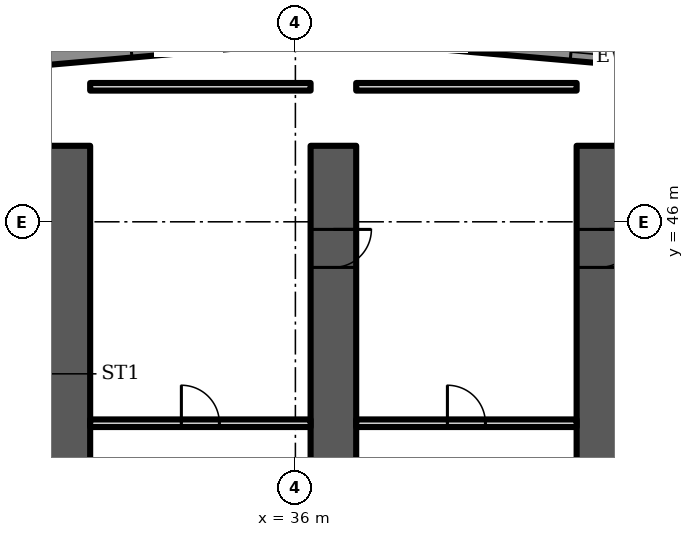
"""IFC4 building model, lengths in metres.
Left out: names, types, materials, properties, quantities, classifications, styles, units other than length and angle.
Written with IfcOpenShell. Run it as: python <this file> out.ifc"""

import sys

from ifc_helpers import new_model, si_unit, direction, frame, frame_2d, origin, place, context, subcontext, project, spatial, rectangle, extrude, element, fill, save


model = new_model("IFC4")
c1 = context("Model", 3, precision=1e-05, world=origin(), true_north=direction((0.0, 1.0)))
c2 = subcontext(c1, "Body", "Model", "MODEL_VIEW")
j1 = project(units=[si_unit("LENGTHUNIT", "METRE"), si_unit("PLANEANGLEUNIT", "RADIAN")], contexts=[c1])
p1 = place(None, origin())
s1 = spatial("IfcSite", under=j1, at=p1, CompositionType="ELEMENT")
p2 = place(p1, origin())
s2 = spatial("IfcBuilding", under=s1, at=p2, CompositionType="ELEMENT")
p3 = place(p2, frame((0.0, 0.0, 27.5)))
s3 = spatial("IfcBuildingStorey", under=s2, at=p3, CompositionType="ELEMENT", Elevation=27.5)
p4 = place(p3, frame((47.301, 50.11, 0.0), z_axis=(0.0, 0.0, 1.0), x_axis=(-0.996195, 0.087143, 0.0)))
e1 = element("IfcWall", 1, at=p4, inside=s3, PredefinedType="SOLIDWALL", context=c2, shape_type="SweptSolid", body=[
    extrude(rectangle(XDim=10.26, YDim=0.45, at=frame_2d((5.13, 0.0))), origin(), (0.0, 0.0, 1.0), 5.2),
])
p5 = place(p4, frame((1.065, 0.0, 1.0)))
e2 = element("IfcOpeningElement", 2, at=p5, cuts=e1, PredefinedType="OPENING", context=c2, shape_type="SweptSolid", body=[
    extrude(rectangle(XDim=3.0, YDim=3.2, at=frame_2d((1.5, 1.6))), frame((0.0, 0.235, 0.0), z_axis=(0.0, -1.0, 0.0), x_axis=(1.0, 0.0, 0.0)), (0.0, 0.0, 1.0), 0.47),
])
p6 = place(p4, frame((6.195, 0.0, 1.0)))
e3 = element("IfcOpeningElement", 3, at=p6, cuts=e1, PredefinedType="OPENING", context=c2, shape_type="SweptSolid", body=[
    extrude(rectangle(XDim=3.0, YDim=3.2, at=frame_2d((1.5, 1.6))), frame((0.0, 0.235, 0.0), z_axis=(0.0, -1.0, 0.0), x_axis=(1.0, 0.0, 0.0)), (0.0, 0.0, 1.0), 0.47),
])
p7 = place(p3, frame((36.0, 50.924, 0.0), z_axis=(0.0, 0.0, 1.0), x_axis=(-0.996195, -0.087145, 0.0)))
e4 = element("IfcWall", 4, at=p7, inside=s3, PredefinedType="SOLIDWALL", context=c2, shape_type="SweptSolid", body=[
    extrude(rectangle(XDim=11.344, YDim=0.45, at=frame_2d((5.672, 0.0))), origin(), (0.0, 0.0, 1.0), 5.2),
])
p8 = place(p7, frame((1.336, 0.0, 1.0)))
e5 = element("IfcOpeningElement", 5, at=p8, cuts=e4, PredefinedType="OPENING", context=c2, shape_type="SweptSolid", body=[
    extrude(rectangle(XDim=3.0, YDim=3.2, at=frame_2d((1.5, 1.6))), frame((0.0, 0.235, 0.0), z_axis=(0.0, -1.0, 0.0), x_axis=(1.0, 0.0, 0.0)), (0.0, 0.0, 1.0), 0.47),
])
p9 = place(p7, frame((7.008, 0.0, 1.0)))
e6 = element("IfcOpeningElement", 6, at=p9, cuts=e4, PredefinedType="OPENING", context=c2, shape_type="SweptSolid", body=[
    extrude(rectangle(XDim=3.0, YDim=3.2, at=frame_2d((1.5, 1.6))), frame((0.0, 0.235, 0.0), z_axis=(0.0, -1.0, 0.0), x_axis=(1.0, 0.0, 0.0)), (0.0, 0.0, 1.0), 0.47),
])
p10 = place(p3, frame((30.0, 35.2, 0.0), z_axis=(0.0, 0.0, 1.0), x_axis=(0.0, 1.0, 0.0)))
e7 = element("IfcWall", 7, at=p10, inside=s3, PredefinedType="SHEAR", context=c2, shape_type="SweptSolid", body=[
    extrude(rectangle(XDim=12.8, YDim=1.2, at=frame_2d((6.4, 0.0))), origin(), (0.0, 0.0, 1.0), 5.2),
])
p11 = place(p10, frame((3.2, 0.0, 0.0)))
e8 = element("IfcOpeningElement", 8, at=p11, cuts=e7, PredefinedType="OPENING", context=c2, shape_type="SweptSolid", body=[
    extrude(rectangle(XDim=1.1, YDim=2.1, at=frame_2d((0.55, 1.05))), frame((0.0, 0.61, 0.0), z_axis=(0.0, -1.0, 0.0), x_axis=(1.0, 0.0, 0.0)), (0.0, 0.0, 1.0), 1.22),
])
p12 = place(p3, frame((37.0, 35.2, 0.0), z_axis=(0.0, 0.0, 1.0), x_axis=(0.0, 1.0, 0.0)))
e9 = element("IfcWall", 9, at=p12, inside=s3, PredefinedType="SHEAR", context=c2, shape_type="SweptSolid", body=[
    extrude(rectangle(XDim=12.8, YDim=1.2, at=frame_2d((6.4, 0.0))), origin(), (0.0, 0.0, 1.0), 5.2),
])
p13 = place(p12, frame((3.2, 0.0, 0.0)))
e10 = element("IfcOpeningElement", 10, at=p13, cuts=e9, PredefinedType="OPENING", context=c2, shape_type="SweptSolid", body=[
    extrude(rectangle(XDim=1.1, YDim=2.1, at=frame_2d((0.55, 1.05))), frame((0.0, 0.61, 0.0), z_axis=(0.0, -1.0, 0.0), x_axis=(1.0, 0.0, 0.0)), (0.0, 0.0, 1.0), 1.22),
])
p14 = place(p12, frame((9.6, 0.0, 0.0)))
e11 = element("IfcOpeningElement", 11, at=p14, cuts=e9, PredefinedType="OPENING", context=c2, shape_type="SweptSolid", body=[
    extrude(rectangle(XDim=1.0, YDim=2.1, at=frame_2d((0.5, 1.05))), frame((0.0, 0.61, 0.0), z_axis=(0.0, -1.0, 0.0), x_axis=(1.0, 0.0, 0.0)), (0.0, 0.0, 1.0), 1.22),
])
p15 = place(p3, frame((44.0, 35.2, 0.0), z_axis=(0.0, 0.0, 1.0), x_axis=(0.0, 1.0, 0.0)))
e12 = element("IfcWall", 12, at=p15, inside=s3, PredefinedType="SHEAR", context=c2, shape_type="SweptSolid", body=[
    extrude(rectangle(XDim=12.8, YDim=1.2, at=frame_2d((6.4, 0.0))), origin(), (0.0, 0.0, 1.0), 5.2),
])
p16 = place(p15, frame((3.2, 0.0, 0.0)))
e13 = element("IfcOpeningElement", 13, at=p16, cuts=e12, PredefinedType="OPENING", context=c2, shape_type="SweptSolid", body=[
    extrude(rectangle(XDim=1.1, YDim=2.1, at=frame_2d((0.55, 1.05))), frame((0.0, 0.61, 0.0), z_axis=(0.0, -1.0, 0.0), x_axis=(1.0, 0.0, 0.0)), (0.0, 0.0, 1.0), 1.22),
])
p17 = place(p15, frame((9.6, 0.0, 0.0)))
e14 = element("IfcOpeningElement", 14, at=p17, cuts=e12, PredefinedType="OPENING", context=c2, shape_type="SweptSolid", body=[
    extrude(rectangle(XDim=1.0, YDim=2.1, at=frame_2d((0.5, 1.05))), frame((0.0, 0.61, 0.0), z_axis=(0.0, -1.0, 0.0), x_axis=(1.0, 0.0, 0.0)), (0.0, 0.0, 1.0), 1.22),
])
p18 = place(p3, frame((30.6, 40.7, 0.0), z_axis=(0.0, 0.0, 1.0), x_axis=(1.0, 0.0, 0.0)))
e15 = element("IfcWall", 15, at=p18, inside=s3, PredefinedType="PARTITIONING", context=c2, shape_type="SweptSolid", body=[
    extrude(rectangle(XDim=5.8, YDim=0.2, at=frame_2d((2.9, 0.0))), origin(), (0.0, 0.0, 1.0), 5.2),
])
p19 = place(p18, frame((2.4, 0.0, 0.0)))
e16 = element("IfcOpeningElement", 16, at=p19, cuts=e15, PredefinedType="OPENING", context=c2, shape_type="SweptSolid", body=[
    extrude(rectangle(XDim=1.0, YDim=2.1, at=frame_2d((0.5, 1.05))), frame((0.0, 0.11, 0.0), z_axis=(0.0, -1.0, 0.0), x_axis=(1.0, 0.0, 0.0)), (0.0, 0.0, 1.0), 0.22),
])
p20 = place(p3, frame((30.6, 49.552, 0.0), z_axis=(0.0, 0.0, 1.0), x_axis=(1.0, 0.0, 0.0)))
e17 = element("IfcWall", 17, at=p20, inside=s3, PredefinedType="PARTITIONING", context=c2, shape_type="SweptSolid", body=[
    extrude(rectangle(XDim=5.8, YDim=0.2, at=frame_2d((2.9, 0.0))), origin(), (0.0, 0.0, 1.0), 5.2),
])
p21 = place(p3, frame((37.6, 40.7, 0.0), z_axis=(0.0, 0.0, 1.0), x_axis=(1.0, 0.0, 0.0)))
e18 = element("IfcWall", 18, at=p21, inside=s3, PredefinedType="PARTITIONING", context=c2, shape_type="SweptSolid", body=[
    extrude(rectangle(XDim=5.8, YDim=0.2, at=frame_2d((2.9, 0.0))), origin(), (0.0, 0.0, 1.0), 5.2),
])
p22 = place(p21, frame((2.4, 0.0, 0.0)))
e19 = element("IfcOpeningElement", 19, at=p22, cuts=e18, PredefinedType="OPENING", context=c2, shape_type="SweptSolid", body=[
    extrude(rectangle(XDim=1.0, YDim=2.1, at=frame_2d((0.5, 1.05))), frame((0.0, 0.11, 0.0), z_axis=(0.0, -1.0, 0.0), x_axis=(1.0, 0.0, 0.0)), (0.0, 0.0, 1.0), 0.22),
])
p23 = place(p3, frame((37.6, 49.552, 0.0), z_axis=(0.0, 0.0, 1.0), x_axis=(1.0, 0.0, 0.0)))
e20 = element("IfcWall", 20, at=p23, inside=s3, PredefinedType="PARTITIONING", context=c2, shape_type="SweptSolid", body=[
    extrude(rectangle(XDim=5.8, YDim=0.2, at=frame_2d((2.9, 0.0))), origin(), (0.0, 0.0, 1.0), 5.2),
])
p24 = place(p5, origin())
e21 = element("IfcWindow", 21, at=p24, inside=s3, PartitioningType="SINGLE_PANEL", PredefinedType="WINDOW", context=c2, shape_type="SweptSolid", body=[
    extrude(rectangle(XDim=3.0, YDim=3.2, at=frame_2d((1.5, 1.6))), frame((0.0, 0.105, 0.0), z_axis=(0.0, -1.0, 0.0), x_axis=(1.0, 0.0, 0.0)), (0.0, 0.0, 1.0), 0.06),
])
fill(e2, e21)
p25 = place(p8, origin())
e22 = element("IfcWindow", 22, at=p25, inside=s3, PartitioningType="SINGLE_PANEL", PredefinedType="WINDOW", context=c2, shape_type="SweptSolid", body=[
    extrude(rectangle(XDim=3.0, YDim=3.2, at=frame_2d((1.5, 1.6))), frame((0.0, 0.105, 0.0), z_axis=(0.0, -1.0, 0.0), x_axis=(1.0, 0.0, 0.0)), (0.0, 0.0, 1.0), 0.06),
])
fill(e5, e22)
p26 = place(p19, origin())
e23 = element("IfcDoor", 23, at=p26, inside=s3, OperationType="SINGLE_SWING_LEFT", PredefinedType="DOOR", context=c2, shape_type="SweptSolid", body=[
    extrude(rectangle(XDim=1.0, YDim=2.1, at=frame_2d((0.5, 1.05))), frame((0.0, 0.025, 0.0), z_axis=(0.0, -1.0, 0.0), x_axis=(1.0, 0.0, 0.0)), (0.0, 0.0, 1.0), 0.05),
])
fill(e16, e23)
p27 = place(p22, origin())
e24 = element("IfcDoor", 24, at=p27, inside=s3, OperationType="SINGLE_SWING_LEFT", PredefinedType="DOOR", context=c2, shape_type="SweptSolid", body=[
    extrude(rectangle(XDim=1.0, YDim=2.1, at=frame_2d((0.5, 1.05))), frame((0.0, 0.025, 0.0), z_axis=(0.0, -1.0, 0.0), x_axis=(1.0, 0.0, 0.0)), (0.0, 0.0, 1.0), 0.05),
])
fill(e19, e24)
p28 = place(p14, origin())
e25 = element("IfcDoor", 25, at=p28, inside=s3, OperationType="SINGLE_SWING_RIGHT", PredefinedType="DOOR", context=c2, shape_type="SweptSolid", body=[
    extrude(rectangle(XDim=1.0, YDim=2.1, at=frame_2d((0.5, 1.05))), frame((0.0, 0.6, 0.0), z_axis=(0.0, -1.0, 0.0), x_axis=(1.0, 0.0, 0.0)), (0.0, 0.0, 1.0), 1.199),
])
fill(e11, e25)
p29 = place(p17, origin())
e26 = element("IfcDoor", 26, at=p29, inside=s3, OperationType="SINGLE_SWING_RIGHT", PredefinedType="DOOR", context=c2, shape_type="SweptSolid", body=[
    extrude(rectangle(XDim=1.0, YDim=2.1, at=frame_2d((0.5, 1.05))), frame((0.0, 0.6, 0.0), z_axis=(0.0, -1.0, 0.0), x_axis=(1.0, 0.0, 0.0)), (0.0, 0.0, 1.0), 1.199),
])
fill(e14, e26)
save(model, sys.argv[1])
